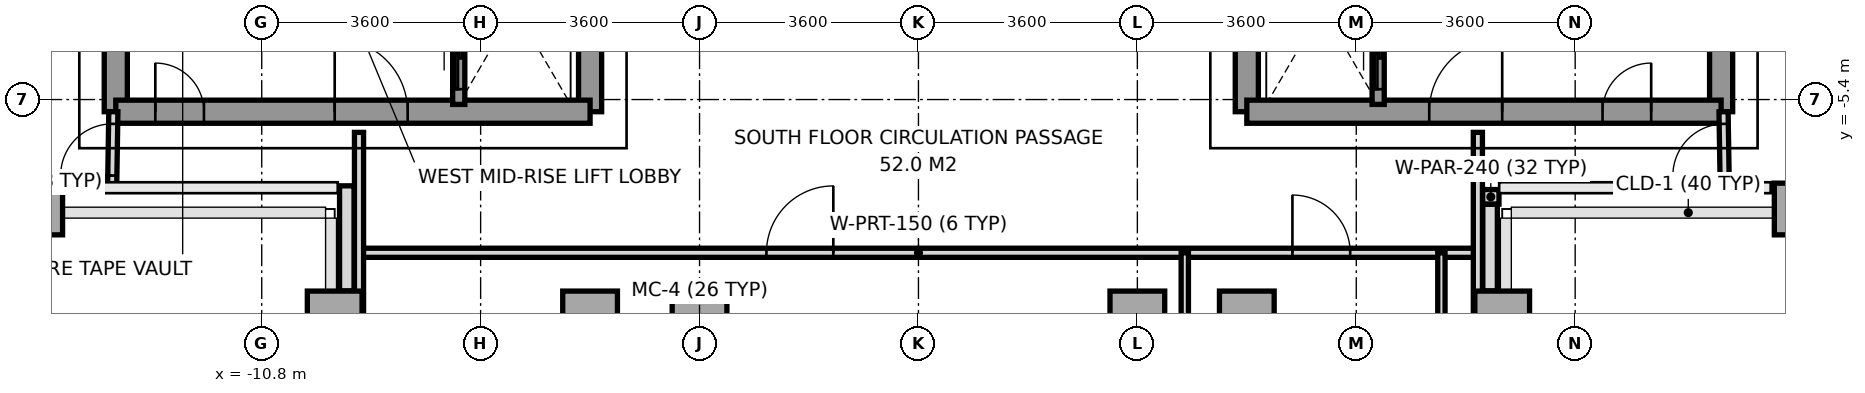
"""IFC4 building model, lengths in metres.
Left out: names, types, materials, properties, quantities, classifications, styles, units other than length and angle.
Written with IfcOpenShell. Run it as: python <this file> out.ifc"""

import sys

from ifc_helpers import new_model, si_unit, direction, frame, frame_2d, origin, origin_2d, place, context, subcontext, project, spatial, rectangle, extrude, source, transform, mapped, element, fill, save


model = new_model("IFC4")
c1 = context("Model", 3, precision=1e-05, world=origin(), true_north=direction((0.0, 1.0)))
c2 = subcontext(c1, "Body", "Model", "MODEL_VIEW")
j1 = project(units=[si_unit("LENGTHUNIT", "METRE"), si_unit("PLANEANGLEUNIT", "RADIAN")], contexts=[c1])
p1 = place(None, origin())
s1 = spatial("IfcSite", under=j1, at=p1, CompositionType="ELEMENT")
p2 = place(p1, origin())
s2 = spatial("IfcBuilding", under=s1, at=p2, CompositionType="ELEMENT")
p3 = place(p2, frame((0.0, 0.0, 156.2)))
s3 = spatial("IfcBuildingStorey", under=s2, at=p3, CompositionType="ELEMENT", Elevation=156.2)
m1 = source(origin(), c2, "Body", "SweptSolid", [
    extrude(rectangle(XDim=0.65, YDim=0.85, at=origin_2d()), origin(), (0.0, 0.0, 1.0), 4.0),
])
p4 = place(p3, frame((-14.4, -7.2, 0.0), z_axis=(0.0, 0.0, 1.0), x_axis=(1.0, 0.0, 0.0)))
e1 = element("IfcColumn", 1, at=p4, inside=s3, PredefinedType="COLUMN", context=c2, shape_type="MappedRepresentation", body=[
    mapped(m1, transform((0.0, 0.0, 0.0), x_axis=(1.0, 0.0, 0.0), y_axis=(0.0, 1.0, 0.0), z_axis=(0.0, 0.0, 1.0), scale=1.0)),
])
m2 = source(origin(), c2, "Body", "SweptSolid", [
    extrude(rectangle(XDim=0.9, YDim=0.9, at=origin_2d()), origin(), (0.0, 0.0, 1.0), 4.0),
])
for number, where, z_axis, x_axis in (
    (2, (-9.6, -9.0, 0.0), (0.0, 0.0, 1.0), (1.0, 0.0, 0.0)),
    (3, (-5.4, -9.0, 0.0), (0.0, 0.0, 1.0), (1.0, 0.0, 0.0)),
    (4, (-3.6, -9.0, 0.0), (0.0, 0.0, 1.0), (1.0, 0.0, 0.0)),
    (5, (3.6, -9.0, 0.0), (0.0, 0.0, 1.0), (1.0, 0.0, 0.0)),
    (6, (5.4, -9.0, 0.0), (0.0, 0.0, 1.0), (1.0, 0.0, 0.0)),
    (7, (9.6, -9.0, 0.0), (0.0, 0.0, 1.0), (1.0, 0.0, 0.0)),
):
    element("IfcColumn", number, at=place(p3, frame(where, z_axis=z_axis, x_axis=x_axis)), inside=s3, PredefinedType="COLUMN", context=c2, shape_type="MappedRepresentation", body=[
        mapped(m2, transform((0.0, 0.0, 0.0), x_axis=(1.0, 0.0, 0.0), y_axis=(0.0, 1.0, 0.0), z_axis=(0.0, 0.0, 1.0), scale=1.0)),
    ])
p5 = place(p3, frame((14.4, -7.2, 0.0), z_axis=(0.0, 0.0, 1.0), x_axis=(1.0, 0.0, 0.0)))
e8 = element("IfcColumn", 8, at=p5, inside=s3, PredefinedType="COLUMN", context=c2, shape_type="MappedRepresentation", body=[
    mapped(m1, transform((0.0, 0.0, 0.0), x_axis=(1.0, 0.0, 0.0), y_axis=(0.0, 1.0, 0.0), z_axis=(0.0, 0.0, 1.0), scale=1.0)),
])
p6 = place(p3, frame((9.547, -7.0, 0.0), z_axis=(0.0, 0.0, 1.0), x_axis=(-1.0, 0.0, 0.0)))
e9 = element("IfcWall", 9, at=p6, inside=s3, PredefinedType="PARAPET", context=c2, shape_type="SweptSolid", body=[
    extrude(rectangle(XDim=0.269, YDim=0.24, at=frame_2d((0.135, 0.0))), origin(), (0.0, 0.0, 1.0), 1.15),
])
p7 = place(p3, frame((9.4, -7.123, 0.0), z_axis=(0.0, 0.0, 1.0), x_axis=(0.0, -1.0, 0.0)))
e10 = element("IfcWall", 10, at=p7, inside=s3, PredefinedType="PARAPET", context=c2, shape_type="SweptSolid", body=[
    extrude(rectangle(XDim=1.424, YDim=0.24, at=frame_2d((0.712, 0.0))), origin(), (0.0, 0.0, 1.0), 1.15),
])
p8 = place(p3, frame((-9.4, -8.547, 0.0), z_axis=(0.0, 0.0, 1.0), x_axis=(0.0, 1.0, 0.0)))
e11 = element("IfcWall", 11, at=p8, inside=s3, PredefinedType="PARAPET", context=c2, shape_type="SweptSolid", body=[
    extrude(rectangle(XDim=1.728, YDim=0.24, at=frame_2d((0.864, 0.0))), origin(), (0.0, 0.0, 1.0), 1.15),
])
p9 = place(p3, frame((-13.2, -5.6, 0.0), z_axis=(0.0, 0.0, 1.0), x_axis=(0.0, 1.0, 0.0)))
e12 = element("IfcWall", 12, at=p9, inside=s3, PredefinedType="SHEAR", context=c2, shape_type="SweptSolid", body=[
    extrude(rectangle(XDim=11.2, YDim=0.38, at=frame_2d((5.6, 0.0))), origin(), (0.0, 0.0, 1.0), 4.0),
])
p10 = place(p3, frame((-5.4, -5.6, 0.0), z_axis=(0.0, 0.0, 1.0), x_axis=(0.0, 1.0, 0.0)))
e13 = element("IfcWall", 13, at=p10, inside=s3, PredefinedType="SHEAR", context=c2, shape_type="SweptSolid", body=[
    extrude(rectangle(XDim=12.5, YDim=0.38, at=frame_2d((6.25, 0.0))), origin(), (0.0, 0.0, 1.0), 4.0),
])
p11 = place(p10, frame((4.55, 0.0, 0.0)))
e14 = element("IfcOpeningElement", 14, at=p11, cuts=e13, PredefinedType="OPENING", context=c2, shape_type="SweptSolid", body=[
    extrude(rectangle(XDim=1.2, YDim=2.2, at=frame_2d((0.6, 1.1))), frame((0.0, 0.2, 0.0), z_axis=(0.0, -1.0, 0.0), x_axis=(1.0, 0.0, 0.0)), (0.0, 0.0, 1.0), 0.4),
])
p12 = place(p10, frame((6.86, 0.0, 0.0)))
e15 = element("IfcOpeningElement", 15, at=p12, cuts=e13, PredefinedType="OPENING", context=c2, shape_type="SweptSolid", body=[
    extrude(rectangle(XDim=0.8, YDim=2.1, at=frame_2d((0.4, 1.05))), frame((0.0, 0.2, 0.0), z_axis=(0.0, -1.0, 0.0), x_axis=(1.0, 0.0, 0.0)), (0.0, 0.0, 1.0), 0.4),
])
p13 = place(p10, frame((7.88, 0.0, 0.0)))
e16 = element("IfcOpeningElement", 16, at=p13, cuts=e13, PredefinedType="OPENING", context=c2, shape_type="SweptSolid", body=[
    extrude(rectangle(XDim=0.8, YDim=2.1, at=frame_2d((0.4, 1.05))), frame((0.0, 0.2, 0.0), z_axis=(0.0, -1.0, 0.0), x_axis=(1.0, 0.0, 0.0)), (0.0, 0.0, 1.0), 0.4),
])
p14 = place(p3, frame((-13.2, -5.6, 0.0), z_axis=(0.0, 0.0, 1.0), x_axis=(1.0, 0.0, 0.0)))
e17 = element("IfcWall", 17, at=p14, inside=s3, PredefinedType="SHEAR", context=c2, shape_type="SweptSolid", body=[
    extrude(rectangle(XDim=7.8, YDim=0.38, at=frame_2d((3.9, 0.0))), origin(), (0.0, 0.0, 1.0), 4.0),
])
p15 = place(p14, frame((3.6, 0.0, 0.0)))
e18 = element("IfcOpeningElement", 18, at=p15, cuts=e17, PredefinedType="OPENING", context=c2, shape_type="SweptSolid", body=[
    extrude(rectangle(XDim=1.2, YDim=2.2, at=frame_2d((0.6, 1.1))), frame((0.0, 0.2, 0.0), z_axis=(0.0, -1.0, 0.0), x_axis=(1.0, 0.0, 0.0)), (0.0, 0.0, 1.0), 0.4),
])
p16 = place(p14, frame((0.65, 0.0, 0.0)))
e19 = element("IfcOpeningElement", 19, at=p16, cuts=e17, PredefinedType="OPENING", context=c2, shape_type="SweptSolid", body=[
    extrude(rectangle(XDim=0.8, YDim=2.1, at=frame_2d((0.4, 1.05))), frame((0.0, 0.2, 0.0), z_axis=(0.0, -1.0, 0.0), x_axis=(1.0, 0.0, 0.0)), (0.0, 0.0, 1.0), 0.4),
])
p17 = place(p3, frame((13.2, -5.6, 0.0), z_axis=(0.0, 0.0, 1.0), x_axis=(0.0, 1.0, 0.0)))
e20 = element("IfcWall", 20, at=p17, inside=s3, PredefinedType="SHEAR", context=c2, shape_type="SweptSolid", body=[
    extrude(rectangle(XDim=11.2, YDim=0.38, at=frame_2d((5.6, 0.0))), origin(), (0.0, 0.0, 1.0), 4.0),
])
p18 = place(p3, frame((5.4, -5.6, 0.0), z_axis=(0.0, 0.0, 1.0), x_axis=(0.0, 1.0, 0.0)))
e21 = element("IfcWall", 21, at=p18, inside=s3, PredefinedType="SHEAR", context=c2, shape_type="SweptSolid", body=[
    extrude(rectangle(XDim=12.5, YDim=0.38, at=frame_2d((6.25, 0.0))), origin(), (0.0, 0.0, 1.0), 4.0),
])
p19 = place(p18, frame((4.55, 0.0, 0.0)))
e22 = element("IfcOpeningElement", 22, at=p19, cuts=e21, PredefinedType="OPENING", context=c2, shape_type="SweptSolid", body=[
    extrude(rectangle(XDim=1.2, YDim=2.2, at=frame_2d((0.6, 1.1))), frame((0.0, 0.2, 0.0), z_axis=(0.0, -1.0, 0.0), x_axis=(1.0, 0.0, 0.0)), (0.0, 0.0, 1.0), 0.4),
])
p20 = place(p3, frame((5.4, -5.6, 0.0), z_axis=(0.0, 0.0, 1.0), x_axis=(1.0, 0.0, 0.0)))
e23 = element("IfcWall", 23, at=p20, inside=s3, PredefinedType="SHEAR", context=c2, shape_type="SweptSolid", body=[
    extrude(rectangle(XDim=7.8, YDim=0.38, at=frame_2d((3.9, 0.0))), origin(), (0.0, 0.0, 1.0), 4.0),
])
p21 = place(p20, frame((3.0, 0.0, 0.0)))
e24 = element("IfcOpeningElement", 24, at=p21, cuts=e23, PredefinedType="OPENING", context=c2, shape_type="SweptSolid", body=[
    extrude(rectangle(XDim=1.2, YDim=2.2, at=frame_2d((0.6, 1.1))), frame((0.0, 0.2, 0.0), z_axis=(0.0, -1.0, 0.0), x_axis=(1.0, 0.0, 0.0)), (0.0, 0.0, 1.0), 0.4),
])
p22 = place(p20, frame((5.85, 0.0, 0.0)))
e25 = element("IfcOpeningElement", 25, at=p22, cuts=e23, PredefinedType="OPENING", context=c2, shape_type="SweptSolid", body=[
    extrude(rectangle(XDim=0.8, YDim=2.1, at=frame_2d((0.4, 1.05))), frame((0.0, 0.2, 0.0), z_axis=(0.0, -1.0, 0.0), x_axis=(1.0, 0.0, 0.0)), (0.0, 0.0, 1.0), 0.4),
])
p23 = place(p3, frame((-7.56, -5.48, 0.0), z_axis=(0.0, 0.0, 1.0), x_axis=(0.0, 1.0, 0.0)))
e26 = element("IfcWall", 26, at=p23, inside=s3, PredefinedType="SOLIDWALL", context=c2, shape_type="SweptSolid", body=[
    extrude(rectangle(XDim=1.6, YDim=0.2, at=frame_2d((0.8, 0.0))), origin(), (0.0, 0.0, 1.0), 4.0),
])
p24 = place(p23, frame((0.25, 0.0, 0.0)))
e27 = element("IfcOpeningElement", 27, at=p24, cuts=e26, PredefinedType="OPENING", context=c2, shape_type="SweptSolid", body=[
    extrude(rectangle(XDim=1.1, YDim=2.2, at=frame_2d((0.55, 1.1))), frame((0.0, 0.11, 0.0), z_axis=(0.0, -1.0, 0.0), x_axis=(1.0, 0.0, 0.0)), (0.0, 0.0, 1.0), 0.22),
])
p25 = place(p3, frame((7.56, -5.48, 0.0), z_axis=(0.0, 0.0, 1.0), x_axis=(0.0, 1.0, 0.0)))
e28 = element("IfcWall", 28, at=p25, inside=s3, PredefinedType="SOLIDWALL", context=c2, shape_type="SweptSolid", body=[
    extrude(rectangle(XDim=1.6, YDim=0.2, at=frame_2d((0.8, 0.0))), origin(), (0.0, 0.0, 1.0), 4.0),
])
p26 = place(p25, frame((0.25, 0.0, 0.0)))
e29 = element("IfcOpeningElement", 29, at=p26, cuts=e28, PredefinedType="OPENING", context=c2, shape_type="SweptSolid", body=[
    extrude(rectangle(XDim=1.1, YDim=2.2, at=frame_2d((0.55, 1.1))), frame((0.0, 0.11, 0.0), z_axis=(0.0, -1.0, 0.0), x_axis=(1.0, 0.0, 0.0)), (0.0, 0.0, 1.0), 0.22),
])
p27 = place(p3, frame((-9.2, -7.92, 0.0), z_axis=(0.0, 0.0, 1.0), x_axis=(1.0, 0.0, 0.0)))
e30 = element("IfcWall", 30, at=p27, inside=s3, PredefinedType="PARTITIONING", context=c2, shape_type="SweptSolid", body=[
    extrude(rectangle(XDim=18.4, YDim=0.15, at=frame_2d((9.2, 0.0))), origin(), (0.0, 0.0, 1.0), 3.6),
])
p28 = place(p27, frame((15.35, 0.0, 0.0)))
e31 = element("IfcOpeningElement", 31, at=p28, cuts=e30, PredefinedType="OPENING", context=c2, shape_type="SweptSolid", body=[
    extrude(rectangle(XDim=0.95, YDim=2.15, at=frame_2d((0.475, 1.075))), frame((0.0, 0.085, 0.0), z_axis=(0.0, -1.0, 0.0), x_axis=(1.0, 0.0, 0.0)), (0.0, 0.0, 1.0), 0.17),
])
p29 = place(p27, frame((6.7, 0.0, 0.0)))
e32 = element("IfcOpeningElement", 32, at=p29, cuts=e30, PredefinedType="OPENING", context=c2, shape_type="SweptSolid", body=[
    extrude(rectangle(XDim=1.1, YDim=2.2, at=frame_2d((0.55, 1.1))), frame((0.0, 0.085, 0.0), z_axis=(0.0, -1.0, 0.0), x_axis=(1.0, 0.0, 0.0)), (0.0, 0.0, 1.0), 0.17),
])
for number, where, z_axis, x_axis in (
    (33, (-9.2, -15.68, 0.0), (0.0, 0.0, 1.0), (0.0, 1.0, 0.0)),
    (34, (9.2, -15.68, 0.0), (0.0, 0.0, 1.0), (0.0, 1.0, 0.0)),
):
    element("IfcWall", number, at=place(p3, frame(where, z_axis=z_axis, x_axis=x_axis)), inside=s3, PredefinedType="PARTITIONING", context=c2, shape_type="SweptSolid", body=[
        extrude(rectangle(XDim=9.74, YDim=0.15, at=frame_2d((4.87, 0.0))), origin(), (0.0, 0.0, 1.0), 3.55),
    ])
p30 = place(p3, frame((4.38, -11.47, 0.0), z_axis=(0.0, 0.0, 1.0), x_axis=(0.0, 1.0, 0.0)))
e35 = element("IfcWall", 35, at=p30, inside=s3, PredefinedType="PARTITIONING", context=c2, shape_type="SweptSolid", body=[
    extrude(rectangle(XDim=3.55, YDim=0.12, at=frame_2d((1.775, 0.0))), origin(), (0.0, 0.0, 1.0), 4.0),
])
p31 = place(p3, frame((8.6, -11.47, 0.0), z_axis=(0.0, 0.0, 1.0), x_axis=(0.0, 1.0, 0.0)))
e36 = element("IfcWall", 36, at=p31, inside=s3, PredefinedType="PARTITIONING", context=c2, shape_type="SweptSolid", body=[
    extrude(rectangle(XDim=3.55, YDim=0.12, at=frame_2d((1.775, 0.0))), origin(), (0.0, 0.0, 1.0), 3.55),
])
p32 = place(p3, frame((-13.26, -6.85, 0.0), z_axis=(0.0, 0.0, 1.0), x_axis=(0.016013571389, 0.999871774545, 0.0)))
e37 = element("IfcWall", 37, at=p32, inside=s3, PredefinedType="PARTITIONING", context=c2, shape_type="SweptSolid", body=[
    extrude(rectangle(XDim=1.25, YDim=0.15, at=frame_2d((0.625, 0.0))), origin(), (0.0, 0.0, 1.0), 4.0),
])
p33 = place(p32, frame((0.2, 0.0, 0.0)))
e38 = element("IfcOpeningElement", 38, at=p33, cuts=e37, PredefinedType="OPENING", context=c2, shape_type="SweptSolid", body=[
    extrude(rectangle(XDim=0.85, YDim=2.1, at=frame_2d((0.425, 1.05))), frame((0.0, 0.085, 0.0), z_axis=(0.0, -1.0, 0.0), x_axis=(1.0, 0.0, 0.0)), (0.0, 0.0, 1.0), 0.17),
])
p34 = place(p3, frame((13.26, -6.85, 0.0), z_axis=(0.0, 0.0, 1.0), x_axis=(-0.016013571389, 0.999871774545, 0.0)))
e39 = element("IfcWall", 39, at=p34, inside=s3, PredefinedType="PARTITIONING", context=c2, shape_type="SweptSolid", body=[
    extrude(rectangle(XDim=1.25, YDim=0.15, at=frame_2d((0.625, 0.0))), origin(), (0.0, 0.0, 1.0), 4.0),
])
p35 = place(p34, frame((0.2, 0.0, 0.0)))
e40 = element("IfcOpeningElement", 40, at=p35, cuts=e39, PredefinedType="OPENING", context=c2, shape_type="SweptSolid", body=[
    extrude(rectangle(XDim=0.85, YDim=2.1, at=frame_2d((0.425, 1.05))), frame((0.0, 0.085, 0.0), z_axis=(0.0, -1.0, 0.0), x_axis=(1.0, 0.0, 0.0)), (0.0, 0.0, 1.0), 0.17),
])
m3 = source(origin(), c2, "Body", "SweptSolid", [
    extrude(rectangle(XDim=1.2, YDim=2.2, at=frame_2d((0.6, 1.1))), frame((0.0, 0.025, 0.0), z_axis=(0.0, -1.0, 0.0), x_axis=(1.0, 0.0, 0.0)), (0.0, 0.0, 1.0), 0.05),
])
p36 = place(p15, origin())
e41 = element("IfcDoor", 41, at=p36, inside=s3, OperationType="SINGLE_SWING_LEFT", PredefinedType="DOOR", context=c2, shape_type="MappedRepresentation", body=[
    mapped(m3, transform((0.0, 0.0, 0.0), x_axis=(1.0, 0.0, 0.0), y_axis=(0.0, 1.0, 0.0), z_axis=(0.0, 0.0, 1.0), scale=1.0)),
])
fill(e18, e41)
p37 = place(p21, origin())
e42 = element("IfcDoor", 42, at=p37, inside=s3, OperationType="SINGLE_SWING_RIGHT", PredefinedType="DOOR", context=c2, shape_type="MappedRepresentation", body=[
    mapped(m3, transform((0.0, 0.0, 0.0), x_axis=(1.0, 0.0, 0.0), y_axis=(0.0, 1.0, 0.0), z_axis=(0.0, 0.0, 1.0), scale=1.0)),
])
fill(e24, e42)
m4 = source(origin(), c2, "Body", "SweptSolid", [
    extrude(rectangle(XDim=0.8, YDim=2.1, at=frame_2d((0.4, 1.05))), frame((0.0, 0.025, 0.0), z_axis=(0.0, -1.0, 0.0), x_axis=(1.0, 0.0, 0.0)), (0.0, 0.0, 1.0), 0.05),
])
p38 = place(p16, origin())
e43 = element("IfcDoor", 43, at=p38, inside=s3, OperationType="SINGLE_SWING_LEFT", PredefinedType="DOOR", context=c2, shape_type="MappedRepresentation", body=[
    mapped(m4, transform((0.0, 0.0, 0.0), x_axis=(1.0, 0.0, 0.0), y_axis=(0.0, 1.0, 0.0), z_axis=(0.0, 0.0, 1.0), scale=1.0)),
])
fill(e19, e43)
p39 = place(p22, origin())
e44 = element("IfcDoor", 44, at=p39, inside=s3, OperationType="SINGLE_SWING_RIGHT", PredefinedType="DOOR", context=c2, shape_type="MappedRepresentation", body=[
    mapped(m4, transform((0.0, 0.0, 0.0), x_axis=(1.0, 0.0, 0.0), y_axis=(0.0, 1.0, 0.0), z_axis=(0.0, 0.0, 1.0), scale=1.0)),
])
fill(e25, e44)
m5 = source(origin(), c2, "Body", "SweptSolid", [
    extrude(rectangle(XDim=1.1, YDim=2.2, at=frame_2d((0.55, 1.1))), frame((0.0, 0.025, 0.0), z_axis=(0.0, -1.0, 0.0), x_axis=(1.0, 0.0, 0.0)), (0.0, 0.0, 1.0), 0.05),
])
p40 = place(p24, origin())
e45 = element("IfcDoor", 45, at=p40, inside=s3, OperationType="SLIDING_TO_LEFT", PredefinedType="DOOR", context=c2, shape_type="MappedRepresentation", body=[
    mapped(m5, transform((0.0, 0.0, 0.0), x_axis=(1.0, 0.0, 0.0), y_axis=(0.0, 1.0, 0.0), z_axis=(0.0, 0.0, 1.0), scale=1.0)),
])
fill(e27, e45)
p41 = place(p26, origin())
e46 = element("IfcDoor", 46, at=p41, inside=s3, OperationType="SLIDING_TO_LEFT", PredefinedType="DOOR", context=c2, shape_type="MappedRepresentation", body=[
    mapped(m5, transform((0.0, 0.0, 0.0), x_axis=(1.0, 0.0, 0.0), y_axis=(0.0, 1.0, 0.0), z_axis=(0.0, 0.0, 1.0), scale=1.0)),
])
fill(e29, e46)
m6 = source(origin(), c2, "Body", "SweptSolid", [
    extrude(rectangle(XDim=0.95, YDim=2.15, at=frame_2d((0.475, 1.075))), frame((0.0, 0.025, 0.0), z_axis=(0.0, -1.0, 0.0), x_axis=(1.0, 0.0, 0.0)), (0.0, 0.0, 1.0), 0.05),
])
p42 = place(p28, origin())
e47 = element("IfcDoor", 47, at=p42, inside=s3, OperationType="SINGLE_SWING_LEFT", PredefinedType="DOOR", context=c2, shape_type="MappedRepresentation", body=[
    mapped(m6, transform((0.0, 0.0, 0.0), x_axis=(1.0, 0.0, 0.0), y_axis=(0.0, 1.0, 0.0), z_axis=(0.0, 0.0, 1.0), scale=1.0)),
])
fill(e31, e47)
p43 = place(p29, origin())
e48 = element("IfcDoor", 48, at=p43, inside=s3, OperationType="SINGLE_SWING_RIGHT", PredefinedType="DOOR", context=c2, shape_type="MappedRepresentation", body=[
    mapped(m5, transform((0.0, 0.0, 0.0), x_axis=(1.0, 0.0, 0.0), y_axis=(0.0, 1.0, 0.0), z_axis=(0.0, 0.0, 1.0), scale=1.0)),
])
fill(e32, e48)
m7 = source(origin(), c2, "Body", "SweptSolid", [
    extrude(rectangle(XDim=0.85, YDim=2.1, at=frame_2d((0.425, 1.05))), frame((0.0, 0.025, 0.0), z_axis=(0.0, -1.0, 0.0), x_axis=(1.0, 0.0, 0.0)), (0.0, 0.0, 1.0), 0.05),
])
p44 = place(p33, origin())
e49 = element("IfcDoor", 49, at=p44, inside=s3, OperationType="SINGLE_SWING_LEFT", PredefinedType="DOOR", context=c2, shape_type="MappedRepresentation", body=[
    mapped(m7, transform((0.0, 0.0, 0.0), x_axis=(1.0, 0.0, 0.0), y_axis=(0.0, 1.0, 0.0), z_axis=(0.0, 0.0, 1.0), scale=1.0)),
])
fill(e38, e49)
p45 = place(p35, origin())
e50 = element("IfcDoor", 50, at=p45, inside=s3, OperationType="SINGLE_SWING_LEFT", PredefinedType="DOOR", context=c2, shape_type="MappedRepresentation", body=[
    mapped(m7, transform((0.0, 0.0, 0.0), x_axis=(1.0, 0.0, 0.0), y_axis=(0.0, 1.0, 0.0), z_axis=(0.0, 0.0, 1.0), scale=1.0)),
])
fill(e40, e50)
save(model, sys.argv[1])
